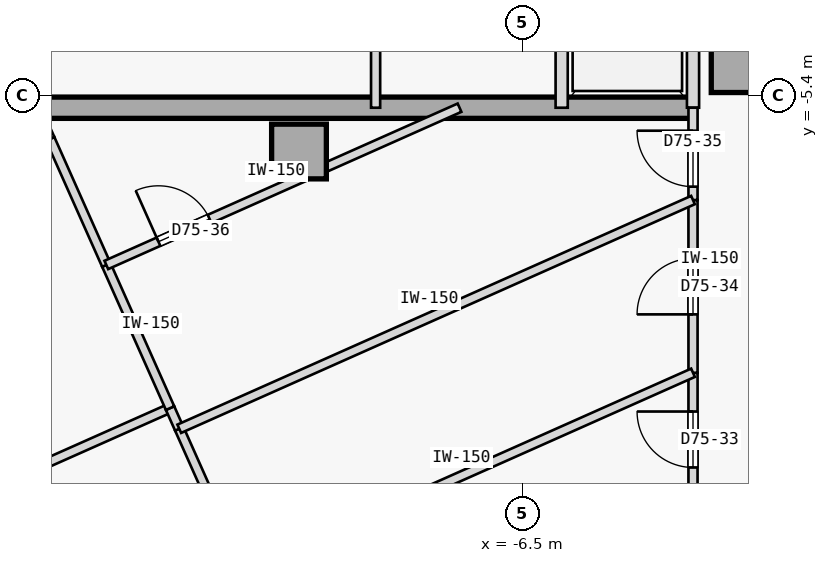
"""IFC4 building model, lengths in metres.
Left out: names, types, materials, properties, quantities, classifications, styles, units other than length and angle.
Written with IfcOpenShell. Run it as: python <this file> out.ifc"""

import sys

from ifc_helpers import new_model, si_unit, direction, frame, frame_2d, origin, origin_2d, place, context, subcontext, project, spatial, rectangle, extrude, element, fill, save


model = new_model("IFC4")
c1 = context("Model", 3, precision=1e-05, world=origin(), true_north=direction((0.0, 1.0)))
c2 = subcontext(c1, "Body", "Model", "MODEL_VIEW")
j1 = project(units=[si_unit("LENGTHUNIT", "METRE"), si_unit("PLANEANGLEUNIT", "RADIAN")], contexts=[c1])
p1 = place(None, origin())
s1 = spatial("IfcSite", under=j1, at=p1, CompositionType="ELEMENT")
p2 = place(p1, origin())
s2 = spatial("IfcBuilding", under=s1, at=p2, CompositionType="ELEMENT")
p3 = place(p2, frame((0.0, 0.0, 281.9)))
s3 = spatial("IfcBuildingStorey", under=s2, at=p3, CompositionType="ELEMENT", Elevation=281.9)
for number, where, z_axis, x_axis in (
    (1, (-10.18, -6.32, 0.0), (0.0, 0.0, 1.0), (1.0, 0.0, 0.0)),
    (2, (-2.95, -4.9, 0.0), (0.0, 0.0, 1.0), (1.0, 0.0, 0.0)),
):
    element("IfcColumn", number, at=place(p3, frame(where, z_axis=z_axis, x_axis=x_axis)), inside=s3, PredefinedType="COLUMN", context=c2, shape_type="SweptSolid", body=[
        extrude(rectangle(XDim=0.9, YDim=0.9, at=origin_2d()), origin(), (0.0, 0.0, 1.0), 3.35),
    ])
p4 = place(p3, frame((-14.56, -5.6, 0.0), z_axis=(0.0, 0.0, 1.0), x_axis=(1.0, 0.0, 0.0)))
e3 = element("IfcWall", 3, at=p4, inside=s3, PredefinedType="SHEAR", context=c2, shape_type="SweptSolid", body=[
    extrude(rectangle(XDim=10.86, YDim=0.35, at=frame_2d((5.43, 0.0))), origin(), (0.0, 0.0, 1.0), 3.125),
])
for number, where, z_axis, x_axis in (
    (4, (-3.7, -5.6, 0.0), (0.0, 0.0, 1.0), (0.0, 1.0, 0.0)),
    (5, (-5.86, -5.6, 0.0), (0.0, 0.0, 1.0), (0.0, 1.0, 0.0)),
):
    element("IfcWall", number, at=place(p3, frame(where, z_axis=z_axis, x_axis=x_axis)), inside=s3, PredefinedType="STANDARD", context=c2, shape_type="SweptSolid", body=[
        extrude(rectangle(XDim=2.65, YDim=0.2, at=frame_2d((1.325, 0.0))), origin(), (0.0, 0.0, 1.0), 3.125),
    ])
p5 = place(p3, frame((-8.92, -5.6, 0.0), z_axis=(0.0, 0.0, 1.0), x_axis=(0.0, 1.0, 0.0)))
e6 = element("IfcWall", 6, at=p5, inside=s3, PredefinedType="PARTITIONING", context=c2, shape_type="SweptSolid", body=[
    extrude(rectangle(XDim=2.65, YDim=0.15, at=frame_2d((1.325, 0.0))), origin(), (0.0, 0.0, 1.0), 3.125),
])
p6 = place(p3, frame((-4.445, -15.808, 0.0), z_axis=(0.0, 0.0, 1.0), x_axis=(0.913546853922, 0.406733506966, 0.0)))
e7 = element("IfcWall", 7, at=p6, inside=s3, PredefinedType="PARTITIONING", context=c2, shape_type="SweptSolid", body=[
    extrude(rectangle(XDim=12.751, YDim=0.15, at=frame_2d((6.375, 0.0))), origin(), (0.0, 0.0, 1.0), 3.125),
])
p7 = place(p6, frame((5.9, 0.0, 0.0)))
e8 = element("IfcOpeningElement", 8, at=p7, cuts=e7, PredefinedType="OPENING", context=c2, shape_type="SweptSolid", body=[
    extrude(rectangle(XDim=0.95, YDim=2.15, at=frame_2d((0.475, 1.075))), frame((0.0, 0.085, 0.0), z_axis=(0.0, -1.0, 0.0), x_axis=(1.0, 0.0, 0.0)), (0.0, 0.0, 1.0), 0.17),
])
p8 = place(p3, frame((-3.7, -12.154, 0.0), z_axis=(0.0, 0.0, 1.0), x_axis=(0.000111222333, 0.999999993815, 0.0)))
e9 = element("IfcWall", 9, at=p8, inside=s3, PredefinedType="PARTITIONING", context=c2, shape_type="SweptSolid", body=[
    extrude(rectangle(XDim=2.195, YDim=0.15, at=frame_2d((1.098, 0.0))), origin(), (0.0, 0.0, 1.0), 3.125),
])
p9 = place(p8, frame((0.637, 0.0, 0.0)))
e10 = element("IfcOpeningElement", 10, at=p9, cuts=e9, PredefinedType="OPENING", context=c2, shape_type="SweptSolid", body=[
    extrude(rectangle(XDim=0.92, YDim=2.15, at=frame_2d((0.46, 1.075))), frame((0.0, 0.085, 0.0), z_axis=(0.0, -1.0, 0.0), x_axis=(1.0, 0.0, 0.0)), (0.0, 0.0, 1.0), 0.17),
])
p10 = place(p3, frame((-3.7, -9.958, 0.0), z_axis=(0.0, 0.0, 1.0), x_axis=(-0.000171909917, 0.999999985223, 0.0)))
e11 = element("IfcWall", 11, at=p10, inside=s3, PredefinedType="PARTITIONING", context=c2, shape_type="SweptSolid", body=[
    extrude(rectangle(XDim=2.84, YDim=0.15, at=frame_2d((1.42, 0.0))), origin(), (0.0, 0.0, 1.0), 3.125),
])
p11 = place(p10, frame((0.96, 0.0, 0.0)))
e12 = element("IfcOpeningElement", 12, at=p11, cuts=e11, PredefinedType="OPENING", context=c2, shape_type="SweptSolid", body=[
    extrude(rectangle(XDim=0.92, YDim=2.15, at=frame_2d((0.46, 1.075))), frame((0.0, 0.085, 0.0), z_axis=(0.0, -1.0, 0.0), x_axis=(1.0, 0.0, 0.0)), (0.0, 0.0, 1.0), 0.17),
])
p12 = place(p3, frame((-3.7, -7.118, 0.0), z_axis=(0.0, 0.0, 1.0), x_axis=(0.000321543392, 0.999999948305, 0.0)))
e13 = element("IfcWall", 13, at=p12, inside=s3, PredefinedType="PARTITIONING", context=c2, shape_type="SweptSolid", body=[
    extrude(rectangle(XDim=1.519, YDim=0.15, at=frame_2d((0.759, 0.0))), origin(), (0.0, 0.0, 1.0), 3.125),
])
p13 = place(p12, frame((0.22, 0.0, 0.0)))
e14 = element("IfcOpeningElement", 14, at=p13, cuts=e13, PredefinedType="OPENING", context=c2, shape_type="SweptSolid", body=[
    extrude(rectangle(XDim=0.92, YDim=2.15, at=frame_2d((0.46, 1.075))), frame((0.0, 0.085, 0.0), z_axis=(0.0, -1.0, 0.0), x_axis=(1.0, 0.0, 0.0)), (0.0, 0.0, 1.0), 0.17),
])
p14 = place(p3, frame((-23.043, -15.323, 0.0), z_axis=(0.0, 0.0, 1.0), x_axis=(0.913547681516, 0.406731648137, 0.0)))
e15 = element("IfcWall", 15, at=p14, inside=s3, PredefinedType="PARTITIONING", context=c2, shape_type="SweptSolid", body=[
    extrude(rectangle(XDim=11.76, YDim=0.15, at=frame_2d((5.88, 0.0))), origin(), (0.0, 0.0, 1.0), 3.125),
])
p15 = place(p14, frame((5.42, 0.0, 0.0)))
e16 = element("IfcOpeningElement", 16, at=p15, cuts=e15, PredefinedType="OPENING", context=c2, shape_type="SweptSolid", body=[
    extrude(rectangle(XDim=0.92, YDim=2.15, at=frame_2d((0.46, 1.075))), frame((0.0, 0.085, 0.0), z_axis=(0.0, -1.0, 0.0), x_axis=(1.0, 0.0, 0.0)), (0.0, 0.0, 1.0), 0.17),
])
p16 = place(p3, frame((-11.093, -13.25, 0.0), z_axis=(0.0, 0.0, 1.0), x_axis=(-0.406723252866, 0.91355141923, 0.0)))
e17 = element("IfcWall", 17, at=p16, inside=s3, PredefinedType="PARTITIONING", context=c2, shape_type="SweptSolid", body=[
    extrude(rectangle(XDim=2.595, YDim=0.15, at=frame_2d((1.297, 0.0))), origin(), (0.0, 0.0, 1.0), 3.125),
])
p17 = place(p3, frame((-12.149, -10.88, 0.0), z_axis=(0.0, 0.0, 1.0), x_axis=(-0.406868995548, 0.913486519037, 0.0)))
e18 = element("IfcWall", 18, at=p17, inside=s3, PredefinedType="PARTITIONING", context=c2, shape_type="SweptSolid", body=[
    extrude(rectangle(XDim=0.372, YDim=0.15, at=frame_2d((0.186, 0.0))), origin(), (0.0, 0.0, 1.0), 3.125),
])
p18 = place(p3, frame((-12.3, -10.54, 0.0), z_axis=(0.0, 0.0, 1.0), x_axis=(-0.406788806475, 0.913522231216, 0.0)))
e19 = element("IfcWall", 19, at=p18, inside=s3, PredefinedType="PARTITIONING", context=c2, shape_type="SweptSolid", body=[
    extrude(rectangle(XDim=2.577, YDim=0.15, at=frame_2d((1.289, 0.0))), origin(), (0.0, 0.0, 1.0), 3.125),
])
p19 = place(p3, frame((-13.348, -8.186, 0.0), z_axis=(0.0, 0.0, 1.0), x_axis=(-0.40673740295, 0.913545119324, 0.0)))
e20 = element("IfcWall", 20, at=p19, inside=s3, PredefinedType="PARTITIONING", context=c2, shape_type="SweptSolid", body=[
    extrude(rectangle(XDim=2.269, YDim=0.15, at=frame_2d((1.134, 0.0))), origin(), (0.0, 0.0, 1.0), 3.125),
])
p20 = place(p3, frame((-14.271, -6.113, 0.0), z_axis=(0.0, 0.0, 1.0), x_axis=(-0.406622099206, 0.913596447255, 0.0)))
e21 = element("IfcWall", 21, at=p20, inside=s3, PredefinedType="PARTITIONING", context=c2, shape_type="SweptSolid", body=[
    extrude(rectangle(XDim=0.562, YDim=0.15, at=frame_2d((0.281, 0.0))), origin(), (0.0, 0.0, 1.0), 3.125),
])
p21 = place(p3, frame((-11.093, -13.25, 0.0), z_axis=(0.0, 0.0, 1.0), x_axis=(0.913543891457, 0.406740160767, 0.0)))
e22 = element("IfcWall", 22, at=p21, inside=s3, PredefinedType="PARTITIONING", context=c2, shape_type="SweptSolid", body=[
    extrude(rectangle(XDim=8.093, YDim=0.15, at=frame_2d((4.046, 0.0))), origin(), (0.0, 0.0, 1.0), 3.125),
])
p22 = place(p3, frame((-12.149, -10.88, 0.0), z_axis=(0.0, 0.0, 1.0), x_axis=(0.913542450291, 0.406743397631, 0.0)))
e23 = element("IfcWall", 23, at=p22, inside=s3, PredefinedType="PARTITIONING", context=c2, shape_type="SweptSolid", body=[
    extrude(rectangle(XDim=9.248, YDim=0.15, at=frame_2d((4.624, 0.0))), origin(), (0.0, 0.0, 1.0), 3.125),
])
p23 = place(p3, frame((-13.348, -8.186, 0.0), z_axis=(0.0, 0.0, 1.0), x_axis=(0.913551673432, 0.406722681896, 0.0)))
e24 = element("IfcWall", 24, at=p23, inside=s3, PredefinedType="PARTITIONING", context=c2, shape_type="SweptSolid", body=[
    extrude(rectangle(XDim=6.358, YDim=0.15, at=frame_2d((3.179, 0.0))), origin(), (0.0, 0.0, 1.0), 3.125),
])
p24 = place(p23, frame((0.939, 0.0, 0.0)))
e25 = element("IfcOpeningElement", 25, at=p24, cuts=e24, PredefinedType="OPENING", context=c2, shape_type="SweptSolid", body=[
    extrude(rectangle(XDim=0.92, YDim=2.15, at=frame_2d((0.46, 1.075))), frame((0.0, 0.085, 0.0), z_axis=(0.0, -1.0, 0.0), x_axis=(1.0, 0.0, 0.0)), (0.0, 0.0, 1.0), 0.17),
])
p25 = place(p9, origin())
e26 = element("IfcDoor", 26, at=p25, inside=s3, OperationType="SINGLE_SWING_RIGHT", PredefinedType="DOOR", context=c2, shape_type="SweptSolid", body=[
    extrude(rectangle(XDim=0.92, YDim=2.15, at=frame_2d((0.46, 1.075))), frame((0.0, 0.025, 0.0), z_axis=(0.0, -1.0, 0.0), x_axis=(1.0, 0.0, 0.0)), (0.0, 0.0, 1.0), 0.05),
])
fill(e10, e26)
p26 = place(p11, origin())
e27 = element("IfcDoor", 27, at=p26, inside=s3, OperationType="SINGLE_SWING_LEFT", PredefinedType="DOOR", context=c2, shape_type="SweptSolid", body=[
    extrude(rectangle(XDim=0.92, YDim=2.15, at=frame_2d((0.46, 1.075))), frame((0.0, 0.025, 0.0), z_axis=(0.0, -1.0, 0.0), x_axis=(1.0, 0.0, 0.0)), (0.0, 0.0, 1.0), 0.05),
])
fill(e12, e27)
p27 = place(p13, origin())
e28 = element("IfcDoor", 28, at=p27, inside=s3, OperationType="SINGLE_SWING_RIGHT", PredefinedType="DOOR", context=c2, shape_type="SweptSolid", body=[
    extrude(rectangle(XDim=0.92, YDim=2.15, at=frame_2d((0.46, 1.075))), frame((0.0, 0.025, 0.0), z_axis=(0.0, -1.0, 0.0), x_axis=(1.0, 0.0, 0.0)), (0.0, 0.0, 1.0), 0.05),
])
fill(e14, e28)
p28 = place(p24, origin())
e29 = element("IfcDoor", 29, at=p28, inside=s3, OperationType="SINGLE_SWING_LEFT", PredefinedType="DOOR", context=c2, shape_type="SweptSolid", body=[
    extrude(rectangle(XDim=0.92, YDim=2.15, at=frame_2d((0.46, 1.075))), frame((0.0, 0.025, 0.0), z_axis=(0.0, -1.0, 0.0), x_axis=(1.0, 0.0, 0.0)), (0.0, 0.0, 1.0), 0.05),
])
fill(e25, e29)
save(model, sys.argv[1])
